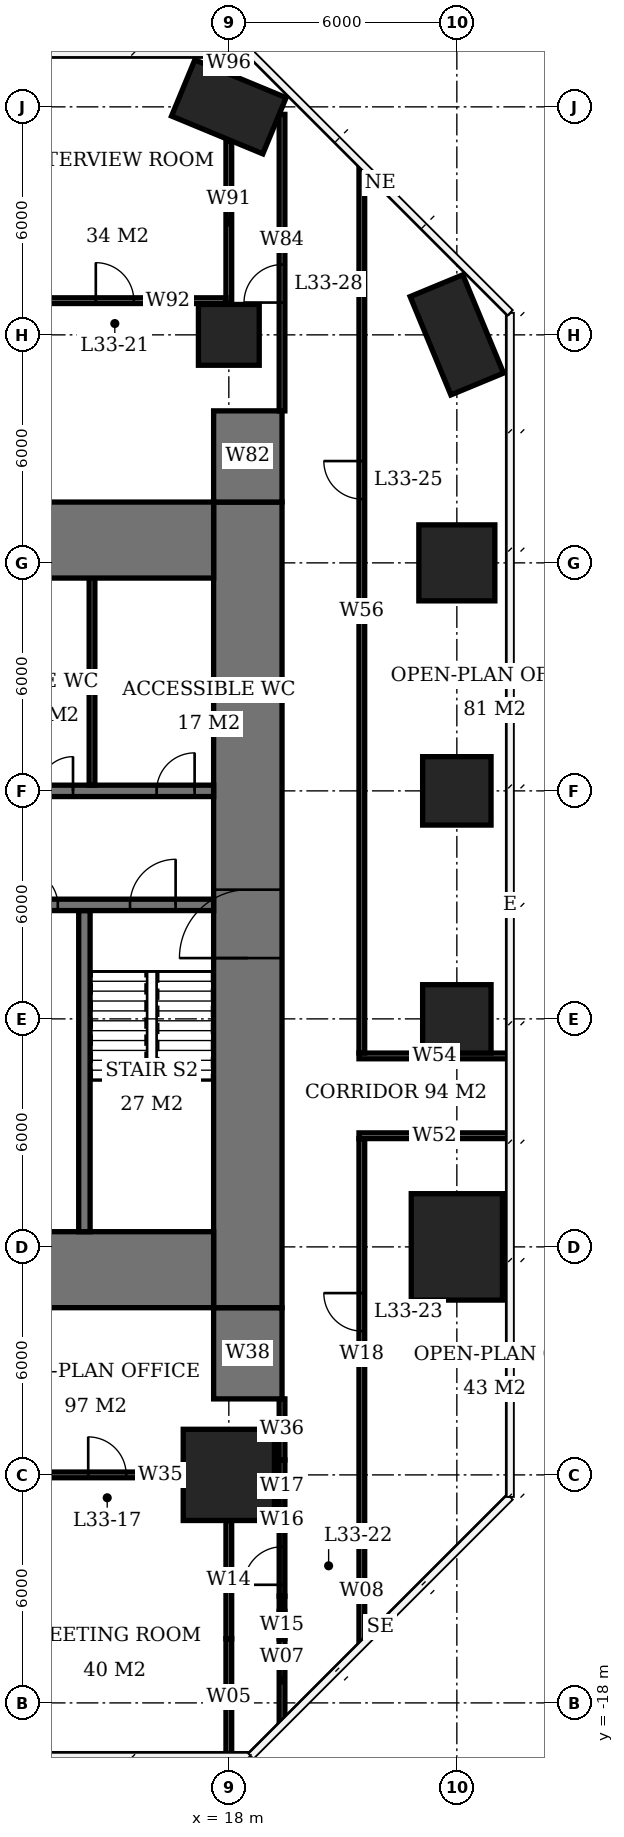
"""IFC4 building model, lengths in metres.
Left out: names, types, materials, properties, quantities, classifications, styles, units other than length and angle.
Written with IfcOpenShell. Run it as: python <this file> out.ifc"""

import sys

from ifc_helpers import new_model, si_unit, direction, frame, frame_2d, origin, origin_2d, place, context, subcontext, project, spatial, rectangle, extrude, element, fill, save


model = new_model("IFC4")
c1 = context("Model", 3, precision=1e-05, world=origin(), true_north=direction((0.0, 1.0)))
c2 = subcontext(c1, "Body", "Model", "MODEL_VIEW")
j1 = project(units=[si_unit("LENGTHUNIT", "METRE"), si_unit("PLANEANGLEUNIT", "RADIAN")], contexts=[c1])
p1 = place(None, origin())
s1 = spatial("IfcSite", under=j1, at=p1, CompositionType="ELEMENT")
p2 = place(p1, origin())
s2 = spatial("IfcBuilding", under=s1, at=p2, CompositionType="ELEMENT")
p3 = place(p2, frame((0.0, 0.0, 136.7)))
s3 = spatial("IfcBuildingStorey", under=s2, at=p3, CompositionType="ELEMENT", Elevation=136.7)
p4 = place(p3, frame((18.0, -12.0, 0.0), z_axis=(0.0, 0.0, 1.0), x_axis=(1.0, 0.0, 0.0)))
e1 = element("IfcColumn", 1, at=p4, inside=s3, PredefinedType="COLUMN", context=c2, shape_type="SweptSolid", body=[
    extrude(rectangle(XDim=2.4, YDim=2.4, at=origin_2d()), origin(), (0.0, 0.0, 1.0), 3.9),
])
p5 = place(p3, frame((18.0, 18.0, 0.0), z_axis=(0.0, 0.0, 1.0), x_axis=(1.0, 0.0, 0.0)))
e2 = element("IfcColumn", 2, at=p5, inside=s3, PredefinedType="COLUMN", context=c2, shape_type="SweptSolid", body=[
    extrude(rectangle(XDim=1.6, YDim=1.6, at=origin_2d()), origin(), (0.0, 0.0, 1.0), 3.9),
])
p6 = place(p3, frame((18.0, 24.0, 0.0), z_axis=(0.0, 0.0, 1.0), x_axis=(0.923879532511, -0.382683432365, 0.0)))
e3 = element("IfcColumn", 3, at=p6, inside=s3, PredefinedType="COLUMN", context=c2, shape_type="SweptSolid", body=[
    extrude(rectangle(XDim=2.6, YDim=1.6, at=origin_2d()), origin(), (0.0, 0.0, 1.0), 3.9),
])
p7 = place(p3, frame((24.0, -6.0, 0.0), z_axis=(0.0, 0.0, 1.0), x_axis=(0.0, 1.0, 0.0)))
e4 = element("IfcColumn", 4, at=p7, inside=s3, PredefinedType="COLUMN", context=c2, shape_type="SweptSolid", body=[
    extrude(rectangle(XDim=2.8, YDim=2.4, at=origin_2d()), origin(), (0.0, 0.0, 1.0), 3.9),
])
for number, where, z_axis, x_axis in (
    (5, (24.0, 0.0, 0.0), (0.0, 0.0, 1.0), (1.0, 0.0, 0.0)),
    (6, (24.0, 6.0, 0.0), (0.0, 0.0, 1.0), (1.0, 0.0, 0.0)),
):
    element("IfcColumn", number, at=place(p3, frame(where, z_axis=z_axis, x_axis=x_axis)), inside=s3, PredefinedType="COLUMN", context=c2, shape_type="SweptSolid", body=[
        extrude(rectangle(XDim=1.8, YDim=1.8, at=origin_2d()), origin(), (0.0, 0.0, 1.0), 3.9),
    ])
p8 = place(p3, frame((24.0, 12.0, 0.0), z_axis=(0.0, 0.0, 1.0), x_axis=(1.0, 0.0, 0.0)))
e7 = element("IfcColumn", 7, at=p8, inside=s3, PredefinedType="COLUMN", context=c2, shape_type="SweptSolid", body=[
    extrude(rectangle(XDim=2.0, YDim=2.0, at=origin_2d()), origin(), (0.0, 0.0, 1.0), 3.9),
])
p9 = place(p3, frame((24.0, 18.0, 0.0), z_axis=(0.0, 0.0, 1.0), x_axis=(0.382683432365, -0.923879532511, 0.0)))
e8 = element("IfcColumn", 8, at=p9, inside=s3, PredefinedType="COLUMN", context=c2, shape_type="SweptSolid", body=[
    extrude(rectangle(XDim=2.8, YDim=1.5, at=origin_2d()), origin(), (0.0, 0.0, 1.0), 3.9),
])
for number, where, z_axis, x_axis in (
    (9, (-5.6, -6.6, 0.0), (0.0, 0.0, 1.0), (1.0, 0.0, 0.0)),
    (10, (-5.6, 12.6, 0.0), (0.0, 0.0, 1.0), (1.0, 0.0, 0.0)),
):
    element("IfcWall", number, at=place(p3, frame(where, z_axis=z_axis, x_axis=x_axis)), inside=s3, PredefinedType="SHEAR", context=c2, shape_type="SweptSolid", body=[
        extrude(rectangle(XDim=23.2, YDim=2.0, at=frame_2d((11.6, 0.0))), origin(), (0.0, 0.0, 1.0), 3.9),
    ])
p10 = place(p3, frame((18.5, -7.6, 0.0), z_axis=(0.0, 0.0, 1.0), x_axis=(0.0, 1.0, 0.0)))
e11 = element("IfcWall", 11, at=p10, inside=s3, PredefinedType="SHEAR", context=c2, shape_type="SweptSolid", body=[
    extrude(rectangle(XDim=21.2, YDim=1.8, at=frame_2d((10.6, 0.0))), origin(), (0.0, 0.0, 1.0), 3.9),
])
p11 = place(p10, frame((9.2, 0.0, 0.0)))
e12 = element("IfcOpeningElement", 12, at=p11, cuts=e11, PredefinedType="OPENING", context=c2, shape_type="SweptSolid", body=[
    extrude(rectangle(XDim=1.8, YDim=2.4, at=frame_2d((0.9, 1.2))), frame((0.0, 0.91, 0.0), z_axis=(0.0, -1.0, 0.0), x_axis=(1.0, 0.0, 0.0)), (0.0, 0.0, 1.0), 1.82),
])
for number, where, z_axis, x_axis in (
    (13, (18.5, -10.0, 0.0), (0.0, 0.0, 1.0), (0.0, 1.0, 0.0)),
    (14, (18.5, 13.6, 0.0), (0.0, 0.0, 1.0), (0.0, 1.0, 0.0)),
):
    element("IfcWall", number, at=place(p3, frame(where, z_axis=z_axis, x_axis=x_axis)), inside=s3, PredefinedType="SHEAR", context=c2, shape_type="SweptSolid", body=[
        extrude(rectangle(XDim=2.4, YDim=1.8, at=frame_2d((1.2, 0.0))), origin(), (0.0, 0.0, 1.0), 3.9),
    ])
p12 = place(p3, frame((12.15, 3.0, 0.0), z_axis=(0.0, 0.0, 1.0), x_axis=(1.0, 0.0, 0.0)))
e15 = element("IfcWall", 15, at=p12, inside=s3, PredefinedType="SHEAR", context=c2, shape_type="SweptSolid", body=[
    extrude(rectangle(XDim=5.45, YDim=0.3, at=frame_2d((2.725, 0.0))), origin(), (0.0, 0.0, 1.0), 3.9),
])
p13 = place(p12, frame((3.25, 0.0, 0.0)))
e16 = element("IfcOpeningElement", 16, at=p13, cuts=e15, PredefinedType="OPENING", context=c2, shape_type="SweptSolid", body=[
    extrude(rectangle(XDim=1.2, YDim=2.1, at=frame_2d((0.6, 1.05))), frame((0.0, 0.16, 0.0), z_axis=(0.0, -1.0, 0.0), x_axis=(1.0, 0.0, 0.0)), (0.0, 0.0, 1.0), 0.32),
])
p14 = place(p12, frame((0.45, 0.0, 0.0)))
e17 = element("IfcOpeningElement", 17, at=p14, cuts=e15, PredefinedType="OPENING", context=c2, shape_type="SweptSolid", body=[
    extrude(rectangle(XDim=0.9, YDim=2.1, at=frame_2d((0.45, 1.05))), frame((0.0, 0.16, 0.0), z_axis=(0.0, -1.0, 0.0), x_axis=(1.0, 0.0, 0.0)), (0.0, 0.0, 1.0), 0.32),
])
p15 = place(p3, frame((-0.15, 6.0, 0.0), z_axis=(0.0, 0.0, 1.0), x_axis=(1.0, 0.0, 0.0)))
e18 = element("IfcWall", 18, at=p15, inside=s3, PredefinedType="SHEAR", context=c2, shape_type="SweptSolid", body=[
    extrude(rectangle(XDim=17.75, YDim=0.3, at=frame_2d((8.875, 0.0))), origin(), (0.0, 0.0, 1.0), 3.9),
])
p16 = place(p15, frame((13.15, 0.0, 0.0)))
e19 = element("IfcOpeningElement", 19, at=p16, cuts=e18, PredefinedType="OPENING", context=c2, shape_type="SweptSolid", body=[
    extrude(rectangle(XDim=0.9, YDim=2.1, at=frame_2d((0.45, 1.05))), frame((0.0, 0.16, 0.0), z_axis=(0.0, -1.0, 0.0), x_axis=(1.0, 0.0, 0.0)), (0.0, 0.0, 1.0), 0.32),
])
p17 = place(p15, frame((16.25, 0.0, 0.0)))
e20 = element("IfcOpeningElement", 20, at=p17, cuts=e18, PredefinedType="OPENING", context=c2, shape_type="SweptSolid", body=[
    extrude(rectangle(XDim=1.0, YDim=2.1, at=frame_2d((0.5, 1.05))), frame((0.0, 0.16, 0.0), z_axis=(0.0, -1.0, 0.0), x_axis=(1.0, 0.0, 0.0)), (0.0, 0.0, 1.0), 0.32),
])
p18 = place(p15, frame((7.25, 0.0, 0.0)))
e21 = element("IfcOpeningElement", 21, at=p18, cuts=e18, PredefinedType="OPENING", context=c2, shape_type="SweptSolid", body=[
    extrude(rectangle(XDim=1.0, YDim=2.1, at=frame_2d((0.5, 1.05))), frame((0.0, 0.16, 0.0), z_axis=(0.0, -1.0, 0.0), x_axis=(1.0, 0.0, 0.0)), (0.0, 0.0, 1.0), 0.32),
])
p19 = place(p15, frame((1.1, 0.0, 0.0)))
e22 = element("IfcOpeningElement", 22, at=p19, cuts=e18, PredefinedType="OPENING", context=c2, shape_type="SweptSolid", body=[
    extrude(rectangle(XDim=1.1, YDim=2.1, at=frame_2d((0.55, 1.05))), frame((0.0, 0.16, 0.0), z_axis=(0.0, -1.0, 0.0), x_axis=(1.0, 0.0, 0.0)), (0.0, 0.0, 1.0), 0.32),
])
p20 = place(p15, frame((4.1, 0.0, 0.0)))
e23 = element("IfcOpeningElement", 23, at=p20, cuts=e18, PredefinedType="OPENING", context=c2, shape_type="SweptSolid", body=[
    extrude(rectangle(XDim=1.1, YDim=2.1, at=frame_2d((0.55, 1.05))), frame((0.0, 0.16, 0.0), z_axis=(0.0, -1.0, 0.0), x_axis=(1.0, 0.0, 0.0)), (0.0, 0.0, 1.0), 0.32),
])
p21 = place(p3, frame((14.2, -5.6, 0.0), z_axis=(0.0, 0.0, 1.0), x_axis=(0.0, 1.0, 0.0)))
e24 = element("IfcWall", 24, at=p21, inside=s3, PredefinedType="SHEAR", context=c2, shape_type="SweptSolid", body=[
    extrude(rectangle(XDim=8.45, YDim=0.3, at=frame_2d((4.225, 0.0))), origin(), (0.0, 0.0, 1.0), 3.9),
])
p22 = place(p3, frame((14.4, 6.15, 0.0), z_axis=(0.0, 0.0, 1.0), x_axis=(0.0, 1.0, 0.0)))
e25 = element("IfcWall", 25, at=p22, inside=s3, PredefinedType="PLUMBINGWALL", context=c2, shape_type="SweptSolid", body=[
    extrude(rectangle(XDim=5.45, YDim=0.15, at=frame_2d((2.725, 0.0))), origin(), (0.0, 0.0, 1.0), 3.65),
])
p23 = place(p3, frame((12.8, -12.0, 0.0), z_axis=(0.0, 0.0, 1.0), x_axis=(1.0, 0.0, 0.0)))
e26 = element("IfcWall", 26, at=p23, inside=s3, PredefinedType="PARTITIONING", context=c2, shape_type="SweptSolid", body=[
    extrude(rectangle(XDim=4.0, YDim=0.15, at=frame_2d((2.0, 0.0))), origin(), (0.0, 0.0, 1.0), 3.65),
])
p24 = place(p23, frame((1.5, 0.0, 0.0)))
e27 = element("IfcOpeningElement", 27, at=p24, cuts=e26, PredefinedType="OPENING", context=c2, shape_type="SweptSolid", body=[
    extrude(rectangle(XDim=1.0, YDim=2.1, at=frame_2d((0.5, 1.05))), frame((0.0, 0.085, 0.0), z_axis=(0.0, -1.0, 0.0), x_axis=(1.0, 0.0, 0.0)), (0.0, 0.0, 1.0), 0.17),
])
p25 = place(p3, frame((12.075, 18.9, 0.0), z_axis=(0.0, 0.0, 1.0), x_axis=(1.0, 0.0, 0.0)))
e28 = element("IfcWall", 28, at=p25, inside=s3, PredefinedType="PARTITIONING", context=c2, shape_type="SweptSolid", body=[
    extrude(rectangle(XDim=5.85, YDim=0.15, at=frame_2d((2.925, 0.0))), origin(), (0.0, 0.0, 1.0), 3.65),
])
p26 = place(p25, frame((2.425, 0.0, 0.0)))
e29 = element("IfcOpeningElement", 29, at=p26, cuts=e28, PredefinedType="OPENING", context=c2, shape_type="SweptSolid", body=[
    extrude(rectangle(XDim=1.0, YDim=2.1, at=frame_2d((0.5, 1.05))), frame((0.0, 0.085, 0.0), z_axis=(0.0, -1.0, 0.0), x_axis=(1.0, 0.0, 0.0)), (0.0, 0.0, 1.0), 0.17),
])
p27 = place(p3, frame((18.0, -19.4, 0.0), z_axis=(0.0, 0.0, 1.0), x_axis=(0.0, 1.0, 0.0)))
e30 = element("IfcWall", 30, at=p27, inside=s3, PredefinedType="PARTITIONING", context=c2, shape_type="SweptSolid", body=[
    extrude(rectangle(XDim=3.09, YDim=0.15, at=frame_2d((1.545, 0.0))), origin(), (0.0, 0.0, 1.0), 3.65),
])
p28 = place(p3, frame((18.0, -16.31, 0.0), z_axis=(0.0, 0.0, 1.0), x_axis=(0.0, 1.0, 0.0)))
e31 = element("IfcWall", 31, at=p28, inside=s3, PredefinedType="PARTITIONING", context=c2, shape_type="SweptSolid", body=[
    extrude(rectangle(XDim=3.11, YDim=0.15, at=frame_2d((1.555, 0.0))), origin(), (0.0, 0.0, 1.0), 2.65),
])
p29 = place(p3, frame((18.0, 18.825, 0.0), z_axis=(0.0, 0.0, 1.0), x_axis=(0.0, 1.0, 0.0)))
e32 = element("IfcWall", 32, at=p29, inside=s3, PredefinedType="PARTITIONING", context=c2, shape_type="SweptSolid", body=[
    extrude(rectangle(XDim=4.278, YDim=0.15, at=frame_2d((2.139, 0.0))), origin(), (0.0, 0.0, 1.0), 3.65),
])
p30 = place(p3, frame((18.0, 24.897, 0.0), z_axis=(0.0, 0.0, 1.0), x_axis=(0.0, 1.0, 0.0)))
e33 = element("IfcWall", 33, at=p30, inside=s3, PredefinedType="PARTITIONING", context=c2, shape_type="SweptSolid", body=[
    extrude(rectangle(XDim=0.503, YDim=0.15, at=frame_2d((0.251, 0.0))), origin(), (0.0, 0.0, 1.0), 3.65),
])
p31 = place(p3, frame((19.4, -18.489, 0.0), z_axis=(0.0, 0.0, 1.0), x_axis=(0.0, 1.0, 0.0)))
e34 = element("IfcWall", 34, at=p31, inside=s3, PredefinedType="PARTITIONING", context=c2, shape_type="SweptSolid", body=[
    extrude(rectangle(XDim=2.179, YDim=0.15, at=frame_2d((1.089, 0.0))), origin(), (0.0, 0.0, 1.0), 3.65),
])
p32 = place(p3, frame((19.4, -16.31, 0.0), z_axis=(0.0, 0.0, 1.0), x_axis=(0.0, 1.0, 0.0)))
e35 = element("IfcWall", 35, at=p32, inside=s3, PredefinedType="PARTITIONING", context=c2, shape_type="SweptSolid", body=[
    extrude(rectangle(XDim=0.72, YDim=0.15, at=frame_2d((0.36, 0.0))), origin(), (0.0, 0.0, 1.0), 2.65),
])
p33 = place(p3, frame((19.4, -15.59, 0.0), z_axis=(0.0, 0.0, 1.0), x_axis=(0.0, 1.0, 0.0)))
e36 = element("IfcWall", 36, at=p33, inside=s3, PredefinedType="PARTITIONING", context=c2, shape_type="SweptSolid", body=[
    extrude(rectangle(XDim=0.398, YDim=0.15, at=frame_2d((0.199, 0.0))), origin(), (0.0, 0.0, 1.0), 3.65),
])
p34 = place(p3, frame((19.4, -15.192, 0.0), z_axis=(0.0, 0.0, 1.0), x_axis=(0.0, 1.0, 0.0)))
e37 = element("IfcWall", 37, at=p34, inside=s3, PredefinedType="PARTITIONING", context=c2, shape_type="SweptSolid", body=[
    extrude(rectangle(XDim=3.584, YDim=0.15, at=frame_2d((1.792, 0.0))), origin(), (0.0, 0.0, 1.0), 2.65),
])
p35 = place(p34, frame((0.3, 0.0, 0.0)))
e38 = element("IfcOpeningElement", 38, at=p35, cuts=e37, PredefinedType="OPENING", context=c2, shape_type="SweptSolid", body=[
    extrude(rectangle(XDim=1.0, YDim=2.1, at=frame_2d((0.5, 1.05))), frame((0.0, 0.085, 0.0), z_axis=(0.0, -1.0, 0.0), x_axis=(1.0, 0.0, 0.0)), (0.0, 0.0, 1.0), 0.17),
])
p36 = place(p3, frame((19.4, -11.608, 0.0), z_axis=(0.0, 0.0, 1.0), x_axis=(0.0, 1.0, 0.0)))
e39 = element("IfcWall", 39, at=p36, inside=s3, PredefinedType="PARTITIONING", context=c2, shape_type="SweptSolid", body=[
    extrude(rectangle(XDim=1.608, YDim=0.15, at=frame_2d((0.804, 0.0))), origin(), (0.0, 0.0, 1.0), 3.65),
])
p37 = place(p3, frame((19.4, 16.0, 0.0), z_axis=(0.0, 0.0, 1.0), x_axis=(0.0, 1.0, 0.0)))
e40 = element("IfcWall", 40, at=p37, inside=s3, PredefinedType="PARTITIONING", context=c2, shape_type="SweptSolid", body=[
    extrude(rectangle(XDim=7.802, YDim=0.15, at=frame_2d((3.901, 0.0))), origin(), (0.0, 0.0, 1.0), 3.65),
])
p38 = place(p37, frame((2.85, 0.0, 0.0)))
e41 = element("IfcOpeningElement", 41, at=p38, cuts=e40, PredefinedType="OPENING", context=c2, shape_type="SweptSolid", body=[
    extrude(rectangle(XDim=1.0, YDim=2.1, at=frame_2d((0.5, 1.05))), frame((0.0, 0.085, 0.0), z_axis=(0.0, -1.0, 0.0), x_axis=(1.0, 0.0, 0.0)), (0.0, 0.0, 1.0), 0.17),
])
p39 = place(p3, frame((21.5, -16.388, 0.0), z_axis=(0.0, 0.0, 1.0), x_axis=(0.0, 1.0, 0.0)))
e42 = element("IfcWall", 42, at=p39, inside=s3, PredefinedType="PARTITIONING", context=c2, shape_type="SweptSolid", body=[
    extrude(rectangle(XDim=2.68, YDim=0.15, at=frame_2d((1.34, 0.0))), origin(), (0.0, 0.0, 1.0), 2.65),
])
p40 = place(p3, frame((21.5, -13.708, 0.0), z_axis=(0.0, 0.0, 1.0), x_axis=(0.0, 1.0, 0.0)))
e43 = element("IfcWall", 43, at=p40, inside=s3, PredefinedType="PARTITIONING", context=c2, shape_type="SweptSolid", body=[
    extrude(rectangle(XDim=10.558, YDim=0.15, at=frame_2d((5.279, 0.0))), origin(), (0.0, 0.0, 1.0), 3.65),
])
p41 = place(p40, frame((5.492, 0.0, 0.0)))
e44 = element("IfcOpeningElement", 44, at=p41, cuts=e43, PredefinedType="OPENING", context=c2, shape_type="SweptSolid", body=[
    extrude(rectangle(XDim=1.0, YDim=2.1, at=frame_2d((0.5, 1.05))), frame((0.0, 0.085, 0.0), z_axis=(0.0, -1.0, 0.0), x_axis=(1.0, 0.0, 0.0)), (0.0, 0.0, 1.0), 0.17),
])
p42 = place(p3, frame((21.425, -3.075, 0.0), z_axis=(0.0, 0.0, 1.0), x_axis=(1.0, 0.0, 0.0)))
e45 = element("IfcWall", 45, at=p42, inside=s3, PredefinedType="PARTITIONING", context=c2, shape_type="SweptSolid", body=[
    extrude(rectangle(XDim=3.975, YDim=0.15, at=frame_2d((1.987, 0.0))), origin(), (0.0, 0.0, 1.0), 3.65),
])
p43 = place(p3, frame((21.5, -0.9, 0.0), z_axis=(0.0, 0.0, 1.0), x_axis=(0.0, 1.0, 0.0)))
e46 = element("IfcWall", 46, at=p43, inside=s3, PredefinedType="PARTITIONING", context=c2, shape_type="SweptSolid", body=[
    extrude(rectangle(XDim=23.288, YDim=0.15, at=frame_2d((11.644, 0.0))), origin(), (0.0, 0.0, 1.0), 3.65),
])
p44 = place(p43, frame((14.579, 0.0, 0.0)))
e47 = element("IfcOpeningElement", 47, at=p44, cuts=e46, PredefinedType="OPENING", context=c2, shape_type="SweptSolid", body=[
    extrude(rectangle(XDim=1.0, YDim=2.1, at=frame_2d((0.5, 1.05))), frame((0.0, 0.085, 0.0), z_axis=(0.0, -1.0, 0.0), x_axis=(1.0, 0.0, 0.0)), (0.0, 0.0, 1.0), 0.17),
])
p45 = place(p3, frame((21.425, -0.975, 0.0), z_axis=(0.0, 0.0, 1.0), x_axis=(1.0, 0.0, 0.0)))
e48 = element("IfcWall", 48, at=p45, inside=s3, PredefinedType="PARTITIONING", context=c2, shape_type="SweptSolid", body=[
    extrude(rectangle(XDim=3.975, YDim=0.15, at=frame_2d((1.987, 0.0))), origin(), (0.0, 0.0, 1.0), 3.65),
])
p46 = place(p11, origin())
e49 = element("IfcDoor", 49, at=p46, inside=s3, OperationType="DOUBLE_DOOR_SINGLE_SWING", PredefinedType="DOOR", context=c2, shape_type="SweptSolid", body=[
    extrude(rectangle(XDim=1.8, YDim=2.4, at=frame_2d((0.9, 1.2))), frame((0.0, 0.025, 0.0), z_axis=(0.0, -1.0, 0.0), x_axis=(1.0, 0.0, 0.0)), (0.0, 0.0, 1.0), 0.05),
])
fill(e12, e49)
p47 = place(p13, origin())
e50 = element("IfcDoor", 50, at=p47, inside=s3, OperationType="SINGLE_SWING_RIGHT", PredefinedType="DOOR", context=c2, shape_type="SweptSolid", body=[
    extrude(rectangle(XDim=1.2, YDim=2.1, at=frame_2d((0.6, 1.05))), frame((0.0, 0.025, 0.0), z_axis=(0.0, -1.0, 0.0), x_axis=(1.0, 0.0, 0.0)), (0.0, 0.0, 1.0), 0.05),
])
fill(e16, e50)
p48 = place(p14, origin())
e51 = element("IfcDoor", 51, at=p48, inside=s3, OperationType="SINGLE_SWING_LEFT", PredefinedType="DOOR", context=c2, shape_type="SweptSolid", body=[
    extrude(rectangle(XDim=0.9, YDim=2.1, at=frame_2d((0.45, 1.05))), frame((0.0, 0.025, 0.0), z_axis=(0.0, -1.0, 0.0), x_axis=(1.0, 0.0, 0.0)), (0.0, 0.0, 1.0), 0.05),
])
fill(e17, e51)
p49 = place(p16, origin())
e52 = element("IfcDoor", 52, at=p49, inside=s3, OperationType="SINGLE_SWING_RIGHT", PredefinedType="DOOR", context=c2, shape_type="SweptSolid", body=[
    extrude(rectangle(XDim=0.9, YDim=2.1, at=frame_2d((0.45, 1.05))), frame((0.0, 0.025, 0.0), z_axis=(0.0, -1.0, 0.0), x_axis=(1.0, 0.0, 0.0)), (0.0, 0.0, 1.0), 0.05),
])
fill(e19, e52)
p50 = place(p17, origin())
e53 = element("IfcDoor", 53, at=p50, inside=s3, OperationType="SINGLE_SWING_RIGHT", PredefinedType="DOOR", context=c2, shape_type="SweptSolid", body=[
    extrude(rectangle(XDim=1.0, YDim=2.1, at=frame_2d((0.5, 1.05))), frame((0.0, 0.025, 0.0), z_axis=(0.0, -1.0, 0.0), x_axis=(1.0, 0.0, 0.0)), (0.0, 0.0, 1.0), 0.05),
])
fill(e20, e53)
p51 = place(p24, origin())
e54 = element("IfcDoor", 54, at=p51, inside=s3, OperationType="SINGLE_SWING_LEFT", PredefinedType="DOOR", context=c2, shape_type="SweptSolid", body=[
    extrude(rectangle(XDim=1.0, YDim=2.1, at=frame_2d((0.5, 1.05))), frame((0.0, 0.025, 0.0), z_axis=(0.0, -1.0, 0.0), x_axis=(1.0, 0.0, 0.0)), (0.0, 0.0, 1.0), 0.05),
])
fill(e27, e54)
p52 = place(p26, origin())
e55 = element("IfcDoor", 55, at=p52, inside=s3, OperationType="SINGLE_SWING_LEFT", PredefinedType="DOOR", context=c2, shape_type="SweptSolid", body=[
    extrude(rectangle(XDim=1.0, YDim=2.1, at=frame_2d((0.5, 1.05))), frame((0.0, 0.025, 0.0), z_axis=(0.0, -1.0, 0.0), x_axis=(1.0, 0.0, 0.0)), (0.0, 0.0, 1.0), 0.05),
])
fill(e29, e55)
p53 = place(p35, origin())
e56 = element("IfcDoor", 56, at=p53, inside=s3, OperationType="SINGLE_SWING_LEFT", PredefinedType="DOOR", context=c2, shape_type="SweptSolid", body=[
    extrude(rectangle(XDim=1.0, YDim=2.1, at=frame_2d((0.5, 1.05))), frame((0.0, 0.025, 0.0), z_axis=(0.0, -1.0, 0.0), x_axis=(1.0, 0.0, 0.0)), (0.0, 0.0, 1.0), 0.05),
])
fill(e38, e56)
p54 = place(p41, origin())
e57 = element("IfcDoor", 57, at=p54, inside=s3, OperationType="SINGLE_SWING_RIGHT", PredefinedType="DOOR", context=c2, shape_type="SweptSolid", body=[
    extrude(rectangle(XDim=1.0, YDim=2.1, at=frame_2d((0.5, 1.05))), frame((0.0, 0.025, 0.0), z_axis=(0.0, -1.0, 0.0), x_axis=(1.0, 0.0, 0.0)), (0.0, 0.0, 1.0), 0.05),
])
fill(e44, e57)
p55 = place(p44, origin())
e58 = element("IfcDoor", 58, at=p55, inside=s3, OperationType="SINGLE_SWING_RIGHT", PredefinedType="DOOR", context=c2, shape_type="SweptSolid", body=[
    extrude(rectangle(XDim=1.0, YDim=2.1, at=frame_2d((0.5, 1.05))), frame((0.0, 0.025, 0.0), z_axis=(0.0, -1.0, 0.0), x_axis=(1.0, 0.0, 0.0)), (0.0, 0.0, 1.0), 0.05),
])
fill(e47, e58)
p56 = place(p38, origin())
e59 = element("IfcDoor", 59, at=p56, inside=s3, OperationType="SINGLE_SWING_LEFT", PredefinedType="DOOR", context=c2, shape_type="SweptSolid", body=[
    extrude(rectangle(XDim=1.0, YDim=2.1, at=frame_2d((0.5, 1.05))), frame((0.0, 0.025, 0.0), z_axis=(0.0, -1.0, 0.0), x_axis=(1.0, 0.0, 0.0)), (0.0, 0.0, 1.0), 0.05),
])
fill(e41, e59)
save(model, sys.argv[1])
